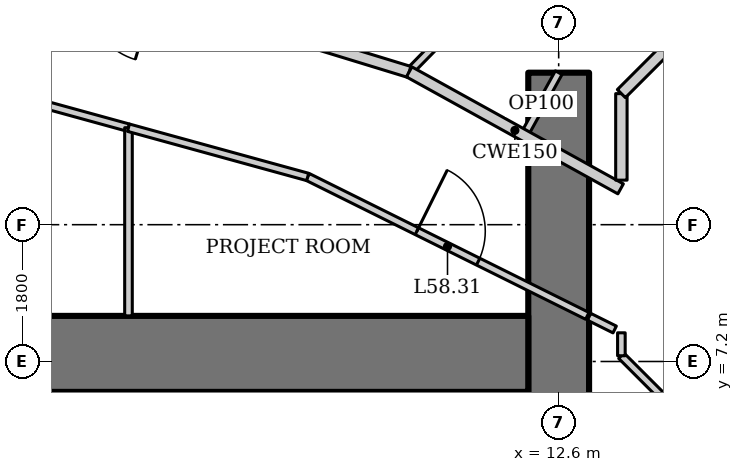
"""IFC4 building model, lengths in metres.
Left out: names, types, materials, properties, quantities, classifications, styles, units other than length and angle.
Written with IfcOpenShell. Run it as: python <this file> out.ifc"""

import sys

from ifc_helpers import new_model, si_unit, direction, frame, frame_2d, origin, place, context, subcontext, project, spatial, rectangle, extrude, element, fill, save


model = new_model("IFC4")
c1 = context("Model", 3, precision=1e-05, world=origin(), true_north=direction((0.0, 1.0)))
c2 = subcontext(c1, "Body", "Model", "MODEL_VIEW")
j1 = project(units=[si_unit("LENGTHUNIT", "METRE"), si_unit("PLANEANGLEUNIT", "RADIAN")], contexts=[c1])
p1 = place(None, origin())
s1 = spatial("IfcSite", under=j1, at=p1, CompositionType="ELEMENT")
p2 = place(p1, origin())
s2 = spatial("IfcBuilding", under=s1, at=p2, CompositionType="ELEMENT")
p3 = place(p2, frame((0.0, 0.0, 249.4)))
s3 = spatial("IfcBuildingStorey", under=s2, at=p3, CompositionType="ELEMENT", Elevation=249.4)
p4 = place(p3, frame((12.6, -11.0, 0.0), z_axis=(0.0, 0.0, 1.0), x_axis=(0.0, 1.0, 0.0)))
e1 = element("IfcWall", 1, at=p4, inside=s3, PredefinedType="SHEAR", context=c2, shape_type="SweptSolid", body=[
    extrude(rectangle(XDim=22.0, YDim=0.8, at=frame_2d((11.0, 0.0))), origin(), (0.0, 0.0, 1.0), 4.2),
])
p5 = place(p4, frame((10.1, 0.0, 0.0)))
e2 = element("IfcOpeningElement", 2, at=p5, cuts=e1, PredefinedType="OPENING", context=c2, shape_type="SweptSolid", body=[
    extrude(rectangle(XDim=1.8, YDim=2.1, at=frame_2d((0.9, 1.05))), frame((0.0, 0.41, 0.0), z_axis=(0.0, -1.0, 0.0), x_axis=(1.0, 0.0, 0.0)), (0.0, 0.0, 1.0), 0.82),
])
p6 = place(p3, frame((12.2, 7.3, 0.0), z_axis=(0.0, 0.0, 1.0), x_axis=(-1.0, 0.0, 0.0)))
e3 = element("IfcWall", 3, at=p6, inside=s3, PredefinedType="SHEAR", context=c2, shape_type="SweptSolid", body=[
    extrude(rectangle(XDim=6.6, YDim=1.0, at=frame_2d((3.3, 0.0))), origin(), (0.0, 0.0, 1.0), 4.2),
])
p7 = place(p3, frame((15.709, 16.199, 0.0), z_axis=(0.0, 0.0, 1.0), x_axis=(-0.699362525935, -0.714767135029, 0.0)))
e4 = element("IfcWall", 4, at=p7, inside=s3, PredefinedType="PARTITIONING", context=c2, shape_type="SweptSolid", body=[
    extrude(rectangle(XDim=7.259, YDim=0.1, at=frame_2d((3.629, 0.0))), origin(), (0.0, 0.0, 1.0), 3.41),
])
p8 = place(p3, frame((10.633, 11.01, 0.0), z_axis=(0.0, 0.0, 1.0), x_axis=(-0.956185837153, 0.292760388079, 0.0)))
e5 = element("IfcWall", 5, at=p8, inside=s3, PredefinedType="PARTITIONING", context=c2, shape_type="SweptSolid", body=[
    extrude(rectangle(XDim=4.544, YDim=0.15, at=frame_2d((2.272, 0.0))), origin(), (0.0, 0.0, 1.0), 4.05),
])
p9 = place(p8, frame((3.494, 0.0, 0.0)))
e6 = element("IfcOpeningElement", 6, at=p9, cuts=e5, PredefinedType="OPENING", context=c2, shape_type="SweptSolid", body=[
    extrude(rectangle(XDim=0.9, YDim=2.1, at=frame_2d((0.45, 1.05))), frame((0.0, 0.085, 0.0), z_axis=(0.0, -1.0, 0.0), x_axis=(1.0, 0.0, 0.0)), (0.0, 0.0, 1.0), 0.17),
])
p10 = place(p3, frame((13.0, 7.788, 0.0), z_axis=(0.0, 0.0, 1.0), x_axis=(0.895721570004, -0.444615416995, 0.0)))
e7 = element("IfcWall", 7, at=p10, inside=s3, PredefinedType="PARTITIONING", context=c2, shape_type="SweptSolid", body=[
    extrude(rectangle(XDim=0.376, YDim=0.1, at=frame_2d((0.188, 0.0))), origin(), (0.0, 0.0, 1.0), 4.05),
])
p11 = place(p3, frame((5.445, 10.687, 0.0), z_axis=(0.0, 0.0, 1.0), x_axis=(0.964227536736, -0.265075946476, 0.0)))
e8 = element("IfcWall", 8, at=p11, inside=s3, PredefinedType="PARTITIONING", context=c2, shape_type="SweptSolid", body=[
    extrude(rectangle(XDim=1.55, YDim=0.1, at=frame_2d((0.775, 0.0))), origin(), (0.0, 0.0, 1.0), 4.05),
])
p12 = place(p3, frame((6.94, 10.276, 0.0), z_axis=(0.0, 0.0, 1.0), x_axis=(0.0, -1.0, 0.0)))
e9 = element("IfcWall", 9, at=p12, inside=s3, PredefinedType="PARTITIONING", context=c2, shape_type="SweptSolid", body=[
    extrude(rectangle(XDim=2.476, YDim=0.1, at=frame_2d((1.238, 0.0))), origin(), (0.0, 0.0, 1.0), 4.05),
])
p13 = place(p3, frame((9.298, 9.628, 0.0), z_axis=(0.0, 0.0, 1.0), x_axis=(0.895529831139, -0.445001484874, 0.0)))
e10 = element("IfcWall", 10, at=p13, inside=s3, PredefinedType="PARTITIONING", context=c2, shape_type="SweptSolid", body=[
    extrude(rectangle(XDim=4.108, YDim=0.1, at=frame_2d((2.054, 0.0))), origin(), (0.0, 0.0, 1.0), 4.05),
])
p14 = place(p13, frame((1.604, 0.0, 0.0)))
e11 = element("IfcOpeningElement", 11, at=p14, cuts=e10, PredefinedType="OPENING", context=c2, shape_type="SweptSolid", body=[
    extrude(rectangle(XDim=0.9, YDim=2.1, at=frame_2d((0.45, 1.05))), frame((0.0, 0.06, 0.0), z_axis=(0.0, -1.0, 0.0), x_axis=(1.0, 0.0, 0.0)), (0.0, 0.0, 1.0), 0.12),
])
p15 = place(p3, frame((6.94, 10.276, 0.0), z_axis=(0.0, 0.0, 1.0), x_axis=(0.964255150805, -0.264975478385, 0.0)))
e12 = element("IfcWall", 12, at=p15, inside=s3, PredefinedType="PARTITIONING", context=c2, shape_type="SweptSolid", body=[
    extrude(rectangle(XDim=2.445, YDim=0.1, at=frame_2d((1.223, 0.0))), origin(), (0.0, 0.0, 1.0), 4.05),
])
p16 = place(p3, frame((12.6, 11.0, 0.0), z_axis=(0.0, 0.0, 1.0), x_axis=(-0.484103558985, -0.875010710893, 0.0)))
e13 = element("IfcWall", 13, at=p16, inside=s3, PredefinedType="PARTITIONING", context=c2, shape_type="SweptSolid", body=[
    extrude(rectangle(XDim=0.943, YDim=0.1, at=frame_2d((0.472, 0.0))), origin(), (0.0, 0.0, 1.0), 4.05),
])
p17 = place(p3, frame((13.415, 9.472, 0.0), z_axis=(0.0, 0.0, 1.0), x_axis=(-0.875072100837, 0.483992580869, 0.0)))
e14 = element("IfcWall", 14, at=p17, inside=s3, PredefinedType="PARTITIONING", context=c2, shape_type="SweptSolid", body=[
    extrude(rectangle(XDim=3.179, YDim=0.15, at=frame_2d((1.59, 0.0))), origin(), (0.0, 0.0, 1.0), 4.05),
])
p18 = place(p3, frame((14.025, 6.675, 0.0), z_axis=(0.0, 0.0, 1.0), x_axis=(-0.707106781187, 0.707106781187, 0.0)))
e15 = element("IfcWall", 15, at=p18, inside=s3, PredefinedType="PARTITIONING", context=c2, shape_type="SweptSolid", body=[
    extrude(rectangle(XDim=0.849, YDim=0.1, at=frame_2d((0.425, 0.0))), origin(), (0.0, 0.0, 1.0), 4.05),
])
p19 = place(p3, frame((13.425, 7.275, 0.0), z_axis=(0.0, 0.0, 1.0), x_axis=(0.0, 1.0, 0.0)))
e16 = element("IfcWall", 16, at=p19, inside=s3, PredefinedType="PARTITIONING", context=c2, shape_type="SweptSolid", body=[
    extrude(rectangle(XDim=0.302, YDim=0.1, at=frame_2d((0.151, 0.0))), origin(), (0.0, 0.0, 1.0), 4.05),
])
p20 = place(p3, frame((13.425, 9.586, 0.0), z_axis=(0.0, 0.0, 1.0), x_axis=(0.0, 1.0, 0.0)))
e17 = element("IfcWall", 17, at=p20, inside=s3, PredefinedType="PARTITIONING", context=c2, shape_type="SweptSolid", body=[
    extrude(rectangle(XDim=1.138, YDim=0.15, at=frame_2d((0.569, 0.0))), origin(), (0.0, 0.0, 1.0), 4.05),
])
p21 = place(p3, frame((13.425, 10.725, 0.0), z_axis=(0.0, 0.0, 1.0), x_axis=(0.707106781187, 0.707106781187, 0.0)))
e18 = element("IfcWall", 18, at=p21, inside=s3, PredefinedType="PARTITIONING", context=c2, shape_type="SweptSolid", body=[
    extrude(rectangle(XDim=0.849, YDim=0.15, at=frame_2d((0.425, 0.0))), origin(), (0.0, 0.0, 1.0), 4.05),
])
p22 = place(p14, origin())
e19 = element("IfcDoor", 19, at=p22, inside=s3, OperationType="SINGLE_SWING_LEFT", PredefinedType="DOOR", context=c2, shape_type="SweptSolid", body=[
    extrude(rectangle(XDim=0.9, YDim=2.1, at=frame_2d((0.45, 1.05))), frame((0.0, 0.025, 0.0), z_axis=(0.0, -1.0, 0.0), x_axis=(1.0, 0.0, 0.0)), (0.0, 0.0, 1.0), 0.05),
])
fill(e11, e19)
save(model, sys.argv[1])
